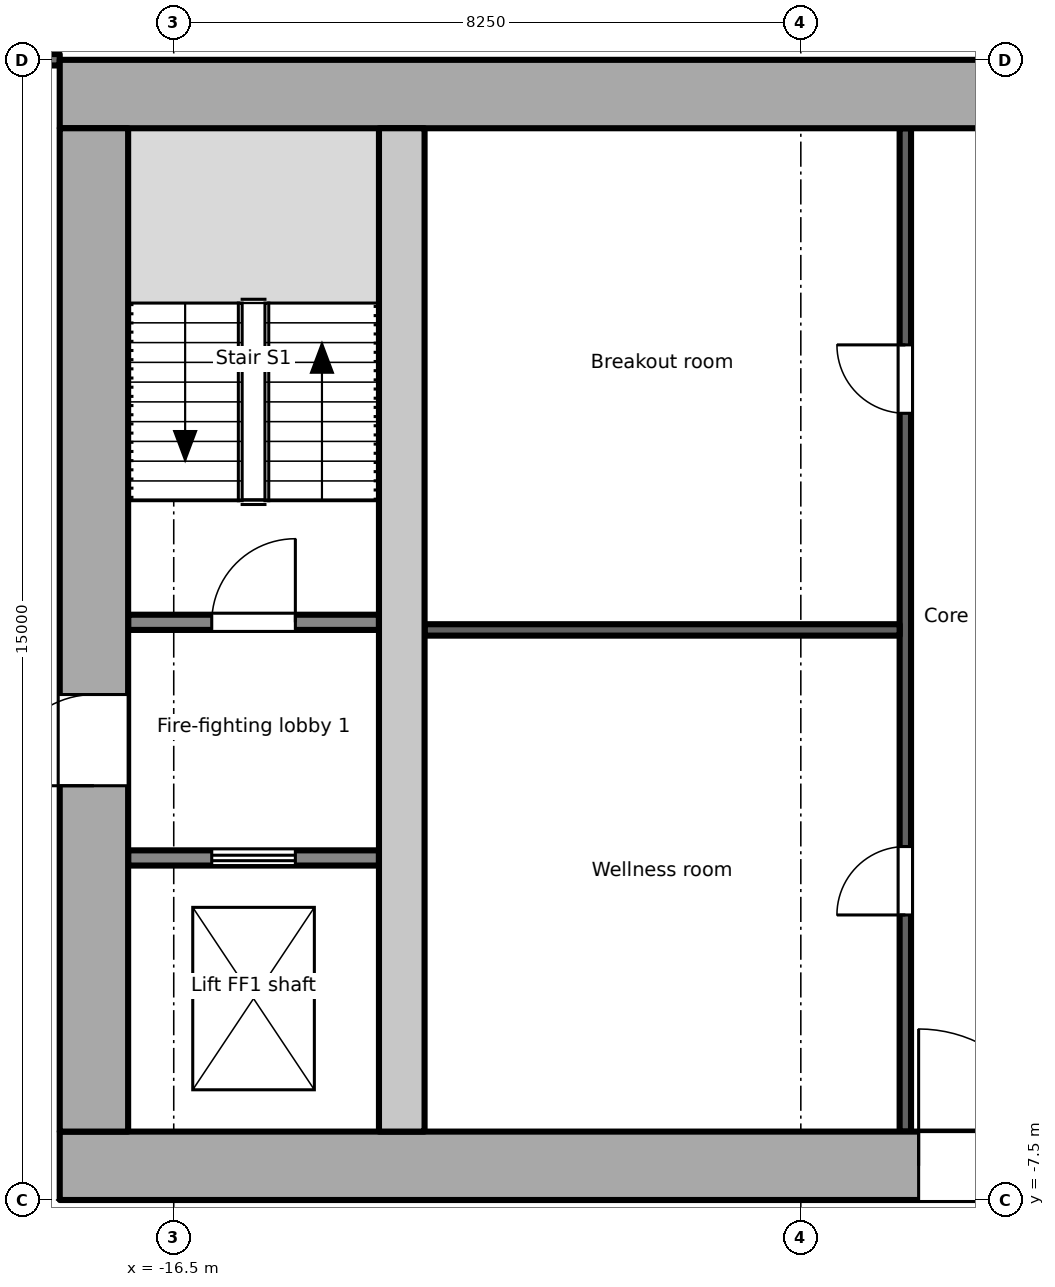
"""IFC4 building model, lengths in metres.
Left out: names, types, materials, properties, quantities, classifications, styles, units other than length and angle.
Written with IfcOpenShell. Run it as: python <this file> out.ifc"""

import sys

from ifc_helpers import new_model, si_unit, direction, frame, frame_2d, origin, place, context, subcontext, project, spatial, rectangle, extrude, element, fill, save


model = new_model("IFC4")
c1 = context("Model", 3, precision=1e-05, world=origin(), true_north=direction((0.0, 1.0)))
c2 = subcontext(c1, "Body", "Model", "MODEL_VIEW")
j1 = project(units=[si_unit("LENGTHUNIT", "METRE"), si_unit("PLANEANGLEUNIT", "RADIAN")], contexts=[c1])
p1 = place(None, origin())
s1 = spatial("IfcSite", under=j1, at=p1, CompositionType="ELEMENT")
p2 = place(p1, origin())
s2 = spatial("IfcBuilding", under=s1, at=p2, CompositionType="ELEMENT")
p3 = place(p2, frame((0.0, 0.0, 274.6)))
s3 = spatial("IfcBuildingStorey", under=s2, at=p3, CompositionType="ELEMENT", Elevation=274.6)
p4 = place(p3, frame((-18.0, -7.05, -0.2), z_axis=(0.0, 0.0, 1.0), x_axis=(1.0, 0.0, 0.0)))
e1 = element("IfcWall", 1, at=p4, inside=s3, PredefinedType="SHEAR", context=c2, shape_type="SweptSolid", body=[
    extrude(rectangle(XDim=36.0, YDim=0.9, at=frame_2d((18.0, 0.0))), origin(), (0.0, 0.0, 1.0), 3.9),
])
p5 = place(p4, frame((11.3, 0.0, 0.2)))
e2 = element("IfcOpeningElement", 2, at=p5, cuts=e1, PredefinedType="OPENING", context=c2, shape_type="SweptSolid", body=[
    extrude(rectangle(XDim=1.8, YDim=2.1, at=frame_2d((0.9, 1.05))), frame((0.0, 0.46, 0.0), z_axis=(0.0, -1.0, 0.0), x_axis=(1.0, 0.0, 0.0)), (0.0, 0.0, 1.0), 0.921),
])
p6 = place(p4, frame((16.8, 0.0, 0.2)))
e3 = element("IfcOpeningElement", 3, at=p6, cuts=e1, PredefinedType="OPENING", context=c2, shape_type="SweptSolid", body=[
    extrude(rectangle(XDim=2.4, YDim=2.1, at=frame_2d((1.2, 1.05))), frame((0.0, 0.46, 0.0), z_axis=(0.0, -1.0, 0.0), x_axis=(1.0, 0.0, 0.0)), (0.0, 0.0, 1.0), 0.921),
])
p7 = place(p4, frame((26.1, 0.0, 0.2)))
e4 = element("IfcOpeningElement", 4, at=p7, cuts=e1, PredefinedType="OPENING", context=c2, shape_type="SweptSolid", body=[
    extrude(rectangle(XDim=2.4, YDim=2.1, at=frame_2d((1.2, 1.05))), frame((0.0, 0.46, 0.0), z_axis=(0.0, -1.0, 0.0), x_axis=(1.0, 0.0, 0.0)), (0.0, 0.0, 1.0), 0.921),
])
p8 = place(p3, frame((-18.0, 7.05, -0.2), z_axis=(0.0, 0.0, 1.0), x_axis=(1.0, 0.0, 0.0)))
e5 = element("IfcWall", 5, at=p8, inside=s3, PredefinedType="SHEAR", context=c2, shape_type="SweptSolid", body=[
    extrude(rectangle(XDim=36.0, YDim=0.9, at=frame_2d((18.0, 0.0))), origin(), (0.0, 0.0, 1.0), 3.9),
])
p9 = place(p3, frame((-17.55, -6.6, -0.2), z_axis=(0.0, 0.0, 1.0), x_axis=(0.0, 1.0, 0.0)))
e6 = element("IfcWall", 6, at=p9, inside=s3, PredefinedType="SHEAR", context=c2, shape_type="SweptSolid", body=[
    extrude(rectangle(XDim=13.2, YDim=0.9, at=frame_2d((6.6, 0.0))), origin(), (0.0, 0.0, 1.0), 3.9),
])
p10 = place(p9, frame((4.55, 0.0, 0.2)))
e7 = element("IfcOpeningElement", 7, at=p10, cuts=e6, PredefinedType="OPENING", context=c2, shape_type="SweptSolid", body=[
    extrude(rectangle(XDim=1.2, YDim=2.1, at=frame_2d((0.6, 1.05))), frame((0.0, 0.46, 0.0), z_axis=(0.0, -1.0, 0.0), x_axis=(1.0, 0.0, 0.0)), (0.0, 0.0, 1.0), 0.921),
])
p11 = place(p3, frame((-13.5, -6.6, -0.2), z_axis=(0.0, 0.0, 1.0), x_axis=(0.0, 1.0, 0.0)))
e8 = element("IfcWall", 8, at=p11, inside=s3, PredefinedType="SHEAR", context=c2, shape_type="SweptSolid", body=[
    extrude(rectangle(XDim=13.2, YDim=0.6, at=frame_2d((6.6, 0.0))), origin(), (0.0, 0.0, 1.0), 3.9),
])
p12 = place(p3, frame((-17.1, -3.0, 0.0), z_axis=(0.0, 0.0, 1.0), x_axis=(1.0, 0.0, 0.0)))
e9 = element("IfcWall", 9, at=p12, inside=s3, PredefinedType="PARTITIONING", context=c2, shape_type="SweptSolid", body=[
    extrude(rectangle(XDim=3.3, YDim=0.2, at=frame_2d((1.65, 0.0))), origin(), (0.0, 0.0, 1.0), 3.7),
])
p13 = place(p12, frame((1.1, 0.0, 0.0)))
e10 = element("IfcOpeningElement", 10, at=p13, cuts=e9, PredefinedType="OPENING", context=c2, shape_type="SweptSolid", body=[
    extrude(rectangle(XDim=1.1, YDim=2.1, at=frame_2d((0.55, 1.05))), frame((0.0, 0.111, 0.0), z_axis=(0.0, -1.0, 0.0), x_axis=(1.0, 0.0, 0.0)), (0.0, 0.0, 1.0), 0.221),
])
p14 = place(p3, frame((-17.1, 0.1, 0.0), z_axis=(0.0, 0.0, 1.0), x_axis=(1.0, 0.0, 0.0)))
e11 = element("IfcWall", 11, at=p14, inside=s3, PredefinedType="PARTITIONING", context=c2, shape_type="SweptSolid", body=[
    extrude(rectangle(XDim=3.3, YDim=0.2, at=frame_2d((1.65, 0.0))), origin(), (0.0, 0.0, 1.0), 3.7),
])
p15 = place(p14, frame((1.1, 0.0, 0.0)))
e12 = element("IfcOpeningElement", 12, at=p15, cuts=e11, PredefinedType="OPENING", context=c2, shape_type="SweptSolid", body=[
    extrude(rectangle(XDim=1.1, YDim=2.1, at=frame_2d((0.55, 1.05))), frame((0.0, 0.111, 0.0), z_axis=(0.0, -1.0, 0.0), x_axis=(1.0, 0.0, 0.0)), (0.0, 0.0, 1.0), 0.221),
])
p16 = place(p3, frame((-6.875, -6.6, 0.0), z_axis=(0.0, 0.0, 1.0), x_axis=(0.0, 1.0, 0.0)))
e13 = element("IfcWall", 13, at=p16, inside=s3, PredefinedType="PARTITIONING", context=c2, shape_type="SweptSolid", body=[
    extrude(rectangle(XDim=13.2, YDim=0.15, at=frame_2d((6.6, 0.0))), origin(), (0.0, 0.0, 1.0), 3.7),
])
p17 = place(p16, frame((2.85, 0.0, 0.0)))
e14 = element("IfcOpeningElement", 14, at=p17, cuts=e13, PredefinedType="OPENING", context=c2, shape_type="SweptSolid", body=[
    extrude(rectangle(XDim=0.9, YDim=2.1, at=frame_2d((0.45, 1.05))), frame((0.0, 0.085, 0.0), z_axis=(0.0, -1.0, 0.0), x_axis=(1.0, 0.0, 0.0)), (0.0, 0.0, 1.0), 0.171),
])
p18 = place(p16, frame((9.45, 0.0, 0.0)))
e15 = element("IfcOpeningElement", 15, at=p18, cuts=e13, PredefinedType="OPENING", context=c2, shape_type="SweptSolid", body=[
    extrude(rectangle(XDim=0.9, YDim=2.1, at=frame_2d((0.45, 1.05))), frame((0.0, 0.085, 0.0), z_axis=(0.0, -1.0, 0.0), x_axis=(1.0, 0.0, 0.0)), (0.0, 0.0, 1.0), 0.171),
])
p19 = place(p3, frame((-13.2, 0.0, 0.0), z_axis=(0.0, 0.0, 1.0), x_axis=(1.0, 0.0, 0.0)))
e16 = element("IfcWall", 16, at=p19, inside=s3, PredefinedType="PARTITIONING", context=c2, shape_type="SweptSolid", body=[
    extrude(rectangle(XDim=6.25, YDim=0.15, at=frame_2d((3.125, 0.0))), origin(), (0.0, 0.0, 1.0), 3.7),
])
p20 = place(p3, frame((-20.625, 7.501, 0.0), z_axis=(0.0, 0.0, 1.0), x_axis=(1.0, 0.0, 0.0)))
e17 = element("IfcWall", 17, at=p20, inside=s3, PredefinedType="PARTITIONING", context=c2, shape_type="SweptSolid", body=[
    extrude(rectangle(XDim=2.625, YDim=0.15, at=frame_2d((1.312, 0.0))), origin(), (0.0, 0.0, 1.0), 3.7),
])
p21 = place(p13, origin())
e18 = element("IfcDoor", 18, at=p21, inside=s3, OperationType="DOUBLE_DOOR_SLIDING", PredefinedType="DOOR", context=c2, shape_type="SweptSolid", body=[
    extrude(rectangle(XDim=1.1, YDim=2.1, at=frame_2d((0.55, 1.05))), frame((0.0, 0.025, 0.0), z_axis=(0.0, -1.0, 0.0), x_axis=(1.0, 0.0, 0.0)), (0.0, 0.0, 1.0), 0.05),
])
fill(e10, e18)
p22 = place(p10, origin())
e19 = element("IfcDoor", 19, at=p22, inside=s3, OperationType="SINGLE_SWING_LEFT", PredefinedType="DOOR", context=c2, shape_type="SweptSolid", body=[
    extrude(rectangle(XDim=1.2, YDim=2.1, at=frame_2d((0.6, 1.05))), frame((0.0, 0.025, 0.0), z_axis=(0.0, -1.0, 0.0), x_axis=(1.0, 0.0, 0.0)), (0.0, 0.0, 1.0), 0.05),
])
fill(e7, e19)
p23 = place(p15, origin())
e20 = element("IfcDoor", 20, at=p23, inside=s3, OperationType="SINGLE_SWING_RIGHT", PredefinedType="DOOR", context=c2, shape_type="SweptSolid", body=[
    extrude(rectangle(XDim=1.1, YDim=2.1, at=frame_2d((0.55, 1.05))), frame((0.0, 0.025, 0.0), z_axis=(0.0, -1.0, 0.0), x_axis=(1.0, 0.0, 0.0)), (0.0, 0.0, 1.0), 0.05),
])
fill(e12, e20)
p24 = place(p17, origin())
e21 = element("IfcDoor", 21, at=p24, inside=s3, OperationType="SINGLE_SWING_LEFT", PredefinedType="DOOR", context=c2, shape_type="SweptSolid", body=[
    extrude(rectangle(XDim=0.9, YDim=2.1, at=frame_2d((0.45, 1.05))), frame((0.0, 0.025, 0.0), z_axis=(0.0, -1.0, 0.0), x_axis=(1.0, 0.0, 0.0)), (0.0, 0.0, 1.0), 0.05),
])
fill(e14, e21)
p25 = place(p18, origin())
e22 = element("IfcDoor", 22, at=p25, inside=s3, OperationType="SINGLE_SWING_RIGHT", PredefinedType="DOOR", context=c2, shape_type="SweptSolid", body=[
    extrude(rectangle(XDim=0.9, YDim=2.1, at=frame_2d((0.45, 1.05))), frame((0.0, 0.025, 0.0), z_axis=(0.0, -1.0, 0.0), x_axis=(1.0, 0.0, 0.0)), (0.0, 0.0, 1.0), 0.05),
])
fill(e15, e22)
p26 = place(p5, origin())
e23 = element("IfcDoor", 23, at=p26, inside=s3, OperationType="SINGLE_SWING_LEFT", PredefinedType="DOOR", context=c2, shape_type="SweptSolid", body=[
    extrude(rectangle(XDim=1.8, YDim=2.1, at=frame_2d((0.9, 1.05))), frame((0.0, 0.025, 0.0), z_axis=(0.0, -1.0, 0.0), x_axis=(1.0, 0.0, 0.0)), (0.0, 0.0, 1.0), 0.05),
])
fill(e2, e23)
save(model, sys.argv[1])
